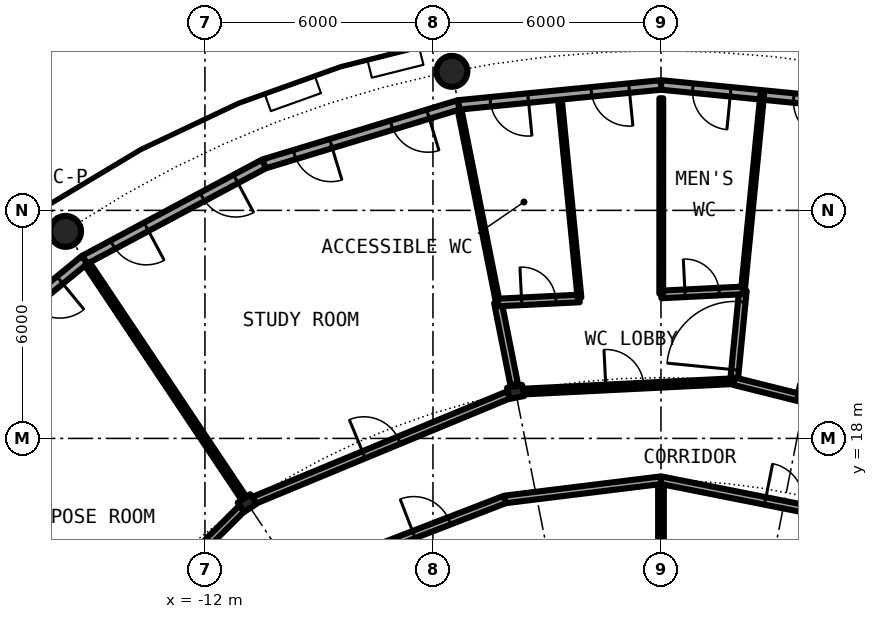
"""IFC4 building model, lengths in metres.
Left out: names, types, materials, properties, quantities, classifications, styles, units other than length and angle.
Written with IfcOpenShell. Run it as: python <this file> out.ifc"""

import sys

from ifc_helpers import new_model, si_unit, direction, frame, frame_2d, origin, origin_2d, place, context, subcontext, project, spatial, rectangle, hollow_circle, i_section, extrude, element, fill, save


model = new_model("IFC4")
c1 = context("Model", 3, precision=1e-05, world=origin(), true_north=direction((0.0, 1.0)))
c2 = subcontext(c1, "Body", "Model", "MODEL_VIEW")
j1 = project(units=[si_unit("LENGTHUNIT", "METRE"), si_unit("PLANEANGLEUNIT", "RADIAN")], contexts=[c1])
p1 = place(None, origin())
s1 = spatial("IfcSite", under=j1, at=p1, CompositionType="ELEMENT")
p2 = place(p1, origin())
s2 = spatial("IfcBuilding", under=s1, at=p2, CompositionType="ELEMENT")
p3 = place(p2, frame((0.0, 0.0, 208.5)))
s3 = spatial("IfcBuildingStorey", under=s2, at=p3, CompositionType="ELEMENT", Elevation=208.5)
for number, where, z_axis, x_axis in (
    (1, (-5.501, 27.658, 0.0), (0.0, 0.0, 1.0), (1.0, 0.0, 0.0)),
    (2, (-15.667, 23.448, 0.0), (0.0, 0.0, 1.0), (1.0, 0.0, 0.0)),
):
    element("IfcColumn", number, at=place(p3, frame(where, z_axis=z_axis, x_axis=x_axis)), inside=s3, PredefinedType="COLUMN", context=c2, shape_type="SweptSolid", body=[
        extrude(hollow_circle(Radius=0.406, WallThickness=0.03, at=origin_2d()), origin(), (0.0, 0.0, 1.0), 4.2),
    ])
for number, where, z_axis, x_axis in (
    (3, (3.824, 19.223, 0.0), (0.0, 0.0, 1.0), (0.195, 0.981, 0.0)),
    (4, (-3.824, 19.223, 0.0), (0.0, 0.0, 1.0), (-0.195, 0.981, 0.0)),
    (5, (-10.889, 16.297, 0.0), (0.0, 0.0, 1.0), (-0.556, 0.831, 0.0)),
):
    element("IfcColumn", number, at=place(p3, frame(where, z_axis=z_axis, x_axis=x_axis)), inside=s3, PredefinedType="COLUMN", context=c2, shape_type="SweptSolid", body=[
        extrude(i_section(OverallWidth=0.3, OverallDepth=0.4, WebThickness=0.013, FlangeThickness=0.024, FilletRadius=0.027, at=origin_2d()), origin(), (0.0, 0.0, 1.0), 4.2),
    ])
p4 = place(p3, frame((5.326, 26.775, 0.0), z_axis=(0.0, 0.0, 1.0), x_axis=(-0.995173996315, 0.098126026407, 0.0)))
e6 = element("IfcWall", 6, at=p4, inside=s3, PredefinedType="SOLIDWALL", context=c2, shape_type="SweptSolid", body=[
    extrude(rectangle(XDim=5.352, YDim=0.25, at=frame_2d((2.676, 0.0))), origin(), (0.0, 0.0, 1.0), 3.85),
])
p5 = place(p4, frame((0.841, 0.0, 0.0)))
e7 = element("IfcOpeningElement", 7, at=p5, cuts=e6, PredefinedType="OPENING", context=c2, shape_type="SweptSolid", body=[
    extrude(rectangle(XDim=1.0, YDim=2.2, at=frame_2d((0.5, 1.1))), frame((0.0, 0.135, 0.0), z_axis=(0.0, -1.0, 0.0), x_axis=(1.0, 0.0, 0.0)), (0.0, 0.0, 1.0), 0.27),
])
p6 = place(p4, frame((3.51, 0.0, 0.0)))
e8 = element("IfcOpeningElement", 8, at=p6, cuts=e6, PredefinedType="OPENING", context=c2, shape_type="SweptSolid", body=[
    extrude(rectangle(XDim=1.0, YDim=2.2, at=frame_2d((0.5, 1.1))), frame((0.0, 0.135, 0.0), z_axis=(0.0, -1.0, 0.0), x_axis=(1.0, 0.0, 0.0)), (0.0, 0.0, 1.0), 0.27),
])
p7 = place(p3, frame((0.0, 27.3, 0.0), z_axis=(0.0, 0.0, 1.0), x_axis=(-0.995173996315, -0.098126026407, 0.0)))
e9 = element("IfcWall", 9, at=p7, inside=s3, PredefinedType="SOLIDWALL", context=c2, shape_type="SweptSolid", body=[
    extrude(rectangle(XDim=5.352, YDim=0.25, at=frame_2d((2.676, 0.0))), origin(), (0.0, 0.0, 1.0), 3.85),
])
p8 = place(p7, frame((0.841, 0.0, 0.0)))
e10 = element("IfcOpeningElement", 10, at=p8, cuts=e9, PredefinedType="OPENING", context=c2, shape_type="SweptSolid", body=[
    extrude(rectangle(XDim=1.0, YDim=2.2, at=frame_2d((0.5, 1.1))), frame((0.0, 0.135, 0.0), z_axis=(0.0, -1.0, 0.0), x_axis=(1.0, 0.0, 0.0)), (0.0, 0.0, 1.0), 0.27),
])
p9 = place(p7, frame((3.51, 0.0, 0.0)))
e11 = element("IfcOpeningElement", 11, at=p9, cuts=e9, PredefinedType="OPENING", context=c2, shape_type="SweptSolid", body=[
    extrude(rectangle(XDim=1.0, YDim=2.2, at=frame_2d((0.5, 1.1))), frame((0.0, 0.135, 0.0), z_axis=(0.0, -1.0, 0.0), x_axis=(1.0, 0.0, 0.0)), (0.0, 0.0, 1.0), 0.27),
])
p10 = place(p3, frame((-5.326, 26.775, 0.0), z_axis=(0.0, 0.0, 1.0), x_axis=(-0.956965678721, -0.290201119486, 0.0)))
e12 = element("IfcWall", 12, at=p10, inside=s3, PredefinedType="SOLIDWALL", context=c2, shape_type="SweptSolid", body=[
    extrude(rectangle(XDim=5.351, YDim=0.25, at=frame_2d((2.676, 0.0))), origin(), (0.0, 0.0, 1.0), 3.85),
])
p11 = place(p10, frame((0.841, 0.0, 0.0)))
e13 = element("IfcOpeningElement", 13, at=p11, cuts=e12, PredefinedType="OPENING", context=c2, shape_type="SweptSolid", body=[
    extrude(rectangle(XDim=1.0, YDim=2.2, at=frame_2d((0.5, 1.1))), frame((0.0, 0.135, 0.0), z_axis=(0.0, -1.0, 0.0), x_axis=(1.0, 0.0, 0.0)), (0.0, 0.0, 1.0), 0.27),
])
p12 = place(p10, frame((3.51, 0.0, 0.0)))
e14 = element("IfcOpeningElement", 14, at=p12, cuts=e12, PredefinedType="OPENING", context=c2, shape_type="SweptSolid", body=[
    extrude(rectangle(XDim=1.0, YDim=2.2, at=frame_2d((0.5, 1.1))), frame((0.0, 0.135, 0.0), z_axis=(0.0, -1.0, 0.0), x_axis=(1.0, 0.0, 0.0)), (0.0, 0.0, 1.0), 0.27),
])
p13 = place(p3, frame((-10.447, 25.222, 0.0), z_axis=(0.0, 0.0, 1.0), x_axis=(-0.881915646801, -0.471407246368, 0.0)))
e15 = element("IfcWall", 15, at=p13, inside=s3, PredefinedType="SOLIDWALL", context=c2, shape_type="SweptSolid", body=[
    extrude(rectangle(XDim=5.352, YDim=0.25, at=frame_2d((2.676, 0.0))), origin(), (0.0, 0.0, 1.0), 3.85),
])
p14 = place(p13, frame((0.841, 0.0, 0.0)))
e16 = element("IfcOpeningElement", 16, at=p14, cuts=e15, PredefinedType="OPENING", context=c2, shape_type="SweptSolid", body=[
    extrude(rectangle(XDim=1.0, YDim=2.2, at=frame_2d((0.5, 1.1))), frame((0.0, 0.135, 0.0), z_axis=(0.0, -1.0, 0.0), x_axis=(1.0, 0.0, 0.0)), (0.0, 0.0, 1.0), 0.27),
])
p15 = place(p13, frame((3.51, 0.0, 0.0)))
e17 = element("IfcOpeningElement", 17, at=p15, cuts=e15, PredefinedType="OPENING", context=c2, shape_type="SweptSolid", body=[
    extrude(rectangle(XDim=1.0, YDim=2.2, at=frame_2d((0.5, 1.1))), frame((0.0, 0.135, 0.0), z_axis=(0.0, -1.0, 0.0), x_axis=(1.0, 0.0, 0.0)), (0.0, 0.0, 1.0), 0.27),
])
p16 = place(p3, frame((-15.167, 22.699, 0.0), z_axis=(0.0, 0.0, 1.0), x_axis=(-0.773019449054, -0.634382322723, 0.0)))
e18 = element("IfcWall", 18, at=p16, inside=s3, PredefinedType="SOLIDWALL", context=c2, shape_type="SweptSolid", body=[
    extrude(rectangle(XDim=5.352, YDim=0.25, at=frame_2d((2.676, 0.0))), origin(), (0.0, 0.0, 1.0), 3.85),
])
p17 = place(p16, frame((0.841, 0.0, 0.0)))
e19 = element("IfcOpeningElement", 19, at=p17, cuts=e18, PredefinedType="OPENING", context=c2, shape_type="SweptSolid", body=[
    extrude(rectangle(XDim=1.0, YDim=2.2, at=frame_2d((0.5, 1.1))), frame((0.0, 0.135, 0.0), z_axis=(0.0, -1.0, 0.0), x_axis=(1.0, 0.0, 0.0)), (0.0, 0.0, 1.0), 0.27),
])
p18 = place(p16, frame((3.51, 0.0, 0.0)))
e20 = element("IfcOpeningElement", 20, at=p18, cuts=e18, PredefinedType="OPENING", context=c2, shape_type="SweptSolid", body=[
    extrude(rectangle(XDim=1.0, YDim=2.2, at=frame_2d((0.5, 1.1))), frame((0.0, 0.135, 0.0), z_axis=(0.0, -1.0, 0.0), x_axis=(1.0, 0.0, 0.0)), (0.0, 0.0, 1.0), 0.27),
])
p19 = place(p3, frame((-15.098, 22.595, 0.0), z_axis=(0.0, 0.0, 1.0), x_axis=(0.555624175463, -0.831433566583, 0.0)))
e21 = element("IfcWall", 21, at=p19, inside=s3, PredefinedType="PARTITIONING", context=c2, shape_type="SweptSolid", body=[
    extrude(rectangle(XDim=7.375, YDim=0.15, at=frame_2d((3.688, 0.0))), origin(), (0.0, 0.0, 1.0), 3.85),
])
p20 = place(p3, frame((-5.301, 26.653, 0.0), z_axis=(0.0, 0.0, 1.0), x_axis=(0.194963902417, -0.980810418355, 0.0)))
e22 = element("IfcWall", 22, at=p20, inside=s3, PredefinedType="PARTITIONING", context=c2, shape_type="SweptSolid", body=[
    extrude(rectangle(XDim=5.176, YDim=0.1, at=frame_2d((2.588, 0.0))), origin(), (0.0, 0.0, 1.0), 3.85),
])
p21 = place(p3, frame((-4.292, 21.577, 0.0), z_axis=(0.0, 0.0, 1.0), x_axis=(0.195048593079, -0.980793579882, 0.0)))
e23 = element("IfcWall", 23, at=p21, inside=s3, PredefinedType="PARTITIONING", context=c2, shape_type="SweptSolid", body=[
    extrude(rectangle(XDim=2.199, YDim=0.2, at=frame_2d((1.1, 0.0))), origin(), (0.0, 0.0, 1.0), 3.85),
])
p22 = place(p3, frame((0.0, 7.72, 0.0), z_axis=(0.0, 0.0, 1.0), x_axis=(0.0, 1.0, 0.0)))
e24 = element("IfcWall", 24, at=p22, inside=s3, PredefinedType="PARTITIONING", context=c2, shape_type="SweptSolid", body=[
    extrude(rectangle(XDim=9.18, YDim=0.15, at=frame_2d((4.59, 0.0))), origin(), (0.0, 0.0, 1.0), 3.85),
])
p23 = place(p3, frame((1.921, 19.506, 0.0), z_axis=(0.0, 0.0, 1.0), x_axis=(0.097982433599, 0.995188144376, 0.0)))
e25 = element("IfcWall", 25, at=p23, inside=s3, PredefinedType="PARTITIONING", context=c2, shape_type="SweptSolid", body=[
    extrude(rectangle(XDim=2.399, YDim=0.2, at=frame_2d((1.2, 0.0))), origin(), (0.0, 0.0, 1.0), 3.85),
])
p24 = place(p23, frame((0.3, 0.0, 0.0)))
e26 = element("IfcOpeningElement", 26, at=p24, cuts=e25, PredefinedType="OPENING", context=c2, shape_type="SweptSolid", body=[
    extrude(rectangle(XDim=1.8, YDim=2.3, at=frame_2d((0.9, 1.15))), frame((0.0, 0.11, 0.0), z_axis=(0.0, -1.0, 0.0), x_axis=(1.0, 0.0, 0.0)), (0.0, 0.0, 1.0), 0.22),
])
p25 = place(p3, frame((2.156, 21.894, 0.0), z_axis=(0.0, 0.0, 1.0), x_axis=(0.098177046306, 0.995168964336, 0.0)))
e27 = element("IfcWall", 27, at=p25, inside=s3, PredefinedType="PARTITIONING", context=c2, shape_type="SweptSolid", body=[
    extrude(rectangle(XDim=5.175, YDim=0.1, at=frame_2d((2.587, 0.0))), origin(), (0.0, 0.0, 1.0), 3.85),
])
p26 = place(p3, frame((2.954, 7.132, 0.0), z_axis=(0.0, 0.0, 1.0), x_axis=(0.382646942224, 0.923894646378, 0.0)))
e28 = element("IfcWall", 28, at=p26, inside=s3, PredefinedType="PARTITIONING", context=c2, shape_type="SweptSolid", body=[
    extrude(rectangle(XDim=9.181, YDim=0.15, at=frame_2d((4.59, 0.0))), origin(), (0.0, 0.0, 1.0), 3.85),
])
p27 = place(p3, frame((0.0, 16.9, 0.0), z_axis=(0.0, 0.0, 1.0), x_axis=(0.980799374359, -0.195019453537, 0.0)))
e29 = element("IfcWall", 29, at=p27, inside=s3, PredefinedType="PARTITIONING", context=c2, shape_type="SweptSolid", body=[
    extrude(rectangle(XDim=6.594, YDim=0.2, at=frame_2d((3.297, 0.0))), origin(), (0.0, 0.0, 1.0), 3.85),
])
p28 = place(p27, frame((2.797, 0.0, 0.0)))
e30 = element("IfcOpeningElement", 30, at=p28, cuts=e29, PredefinedType="OPENING", context=c2, shape_type="SweptSolid", body=[
    extrude(rectangle(XDim=1.0, YDim=2.3, at=frame_2d((0.5, 1.15))), frame((0.0, 0.11, 0.0), z_axis=(0.0, -1.0, 0.0), x_axis=(1.0, 0.0, 0.0)), (0.0, 0.0, 1.0), 0.22),
])
p29 = place(p3, frame((-7.967, 14.904, 0.0), z_axis=(0.0, 0.0, 1.0), x_axis=(0.932943640288, 0.360022449363, 0.0)))
e31 = element("IfcWall", 31, at=p29, inside=s3, PredefinedType="PARTITIONING", context=c2, shape_type="SweptSolid", body=[
    extrude(rectangle(XDim=4.139, YDim=0.2, at=frame_2d((2.069, 0.0))), origin(), (0.0, 0.0, 1.0), 3.85),
])
p30 = place(p29, frame((1.569, 0.0, 0.0)))
e32 = element("IfcOpeningElement", 32, at=p30, cuts=e31, PredefinedType="OPENING", context=c2, shape_type="SweptSolid", body=[
    extrude(rectangle(XDim=1.0, YDim=2.3, at=frame_2d((0.5, 1.15))), frame((0.0, 0.11, 0.0), z_axis=(0.0, -1.0, 0.0), x_axis=(1.0, 0.0, 0.0)), (0.0, 0.0, 1.0), 0.22),
])
p31 = place(p3, frame((-4.106, 16.394, 0.0), z_axis=(0.0, 0.0, 1.0), x_axis=(0.992496033272, 0.122276833211, 0.0)))
e33 = element("IfcWall", 33, at=p31, inside=s3, PredefinedType="PARTITIONING", context=c2, shape_type="SweptSolid", body=[
    extrude(rectangle(XDim=4.137, YDim=0.2, at=frame_2d((2.068, 0.0))), origin(), (0.0, 0.0, 1.0), 3.85),
])
p32 = place(p3, frame((-16.189, 10.997, 0.0), z_axis=(0.0, 0.0, 1.0), x_axis=(0.707106781187, 0.707106781187, 0.0)))
e34 = element("IfcWall", 34, at=p32, inside=s3, PredefinedType="PARTITIONING", context=c2, shape_type="SweptSolid", body=[
    extrude(rectangle(XDim=7.343, YDim=0.2, at=frame_2d((3.671, 0.0))), origin(), (0.0, 0.0, 1.0), 3.6),
])
p33 = place(p32, frame((3.171, 0.0, 0.0)))
e35 = element("IfcOpeningElement", 35, at=p33, cuts=e34, PredefinedType="OPENING", context=c2, shape_type="SweptSolid", body=[
    extrude(rectangle(XDim=1.0, YDim=2.3, at=frame_2d((0.5, 1.15))), frame((0.0, 0.11, 0.0), z_axis=(0.0, -1.0, 0.0), x_axis=(1.0, 0.0, 0.0)), (0.0, 0.0, 1.0), 0.22),
])
p34 = place(p3, frame((-10.748, 16.355, 0.0), z_axis=(0.0, 0.0, 1.0), x_axis=(0.923857139404, 0.382737489635, 0.0)))
e36 = element("IfcWall", 36, at=p34, inside=s3, PredefinedType="PARTITIONING", context=c2, shape_type="SweptSolid", body=[
    extrude(rectangle(XDim=7.342, YDim=0.2, at=frame_2d((3.671, 0.0))), origin(), (0.0, 0.0, 1.0), 3.6),
])
p35 = place(p34, frame((3.171, 0.0, 0.0)))
e37 = element("IfcOpeningElement", 37, at=p35, cuts=e36, PredefinedType="OPENING", context=c2, shape_type="SweptSolid", body=[
    extrude(rectangle(XDim=1.0, YDim=2.3, at=frame_2d((0.5, 1.15))), frame((0.0, 0.11, 0.0), z_axis=(0.0, -1.0, 0.0), x_axis=(1.0, 0.0, 0.0)), (0.0, 0.0, 1.0), 0.22),
])
p36 = place(p3, frame((-3.672, 19.23, 0.0), z_axis=(0.0, 0.0, 1.0), x_axis=(0.998783562084, 0.049309188909, 0.0)))
e38 = element("IfcWall", 38, at=p36, inside=s3, PredefinedType="PARTITIONING", context=c2, shape_type="SweptSolid", body=[
    extrude(rectangle(XDim=5.6, YDim=0.15, at=frame_2d((2.8, 0.0))), origin(), (0.0, 0.0, 1.0), 3.6),
])
p37 = place(p36, frame((2.224, 0.0, 0.0)))
e39 = element("IfcOpeningElement", 39, at=p37, cuts=e38, PredefinedType="OPENING", context=c2, shape_type="SweptSolid", body=[
    extrude(rectangle(XDim=1.0, YDim=2.3, at=frame_2d((0.5, 1.15))), frame((0.0, 0.085, 0.0), z_axis=(0.0, -1.0, 0.0), x_axis=(1.0, 0.0, 0.0)), (0.0, 0.0, 1.0), 0.17),
])
p38 = place(p3, frame((1.921, 19.506, 0.0), z_axis=(0.0, 0.0, 1.0), x_axis=(0.969996560647, -0.243118638391, 0.0)))
e40 = element("IfcWall", 40, at=p38, inside=s3, PredefinedType="PARTITIONING", context=c2, shape_type="SweptSolid", body=[
    extrude(rectangle(XDim=1.773, YDim=0.2, at=frame_2d((0.887, 0.0))), origin(), (0.0, 0.0, 1.0), 3.6),
])
p39 = place(p3, frame((-4.292, 21.576, 0.0), z_axis=(0.0, 0.0, 1.0), x_axis=(0.998786623078, 0.049247147741, 0.0)))
e41 = element("IfcWall", 41, at=p39, inside=s3, PredefinedType="PARTITIONING", context=c2, shape_type="SweptSolid", body=[
    extrude(rectangle(XDim=2.152, YDim=0.2, at=frame_2d((1.076, 0.0))), origin(), (0.0, 0.0, 1.0), 3.85),
])
p40 = place(p39, frame((0.626, 0.0, 0.0)))
e42 = element("IfcOpeningElement", 42, at=p40, cuts=e41, PredefinedType="OPENING", context=c2, shape_type="SweptSolid", body=[
    extrude(rectangle(XDim=0.9, YDim=2.3, at=frame_2d((0.45, 1.15))), frame((0.0, 0.11, 0.0), z_axis=(0.0, -1.0, 0.0), x_axis=(1.0, 0.0, 0.0)), (0.0, 0.0, 1.0), 0.22),
])
p41 = place(p3, frame((0.007, 21.788, 0.0), z_axis=(0.0, 0.0, 1.0), x_axis=(0.998786623078, 0.049247147741, 0.0)))
e43 = element("IfcWall", 43, at=p41, inside=s3, PredefinedType="PARTITIONING", context=c2, shape_type="SweptSolid", body=[
    extrude(rectangle(XDim=2.152, YDim=0.2, at=frame_2d((1.076, 0.0))), origin(), (0.0, 0.0, 1.0), 3.85),
])
p42 = place(p41, frame((0.626, 0.0, 0.0)))
e44 = element("IfcOpeningElement", 44, at=p42, cuts=e43, PredefinedType="OPENING", context=c2, shape_type="SweptSolid", body=[
    extrude(rectangle(XDim=0.9, YDim=2.3, at=frame_2d((0.45, 1.15))), frame((0.0, 0.11, 0.0), z_axis=(0.0, -1.0, 0.0), x_axis=(1.0, 0.0, 0.0)), (0.0, 0.0, 1.0), 0.22),
])
p43 = place(p3, frame((0.007, 21.808, 0.0), z_axis=(0.0, 0.0, 1.0), x_axis=(0.000379848983, 0.999999927857, 0.0)))
e45 = element("IfcWall", 45, at=p43, inside=s3, PredefinedType="PARTITIONING", context=c2, shape_type="SweptSolid", body=[
    extrude(rectangle(XDim=5.142, YDim=0.1, at=frame_2d((2.571, 0.0))), origin(), (0.0, 0.0, 1.0), 3.85),
])
p44 = place(p3, frame((-2.65, 26.819, 0.0), z_axis=(0.0, 0.0, 1.0), x_axis=(0.098205932626, -0.995166114172, 0.0)))
e46 = element("IfcWall", 46, at=p44, inside=s3, PredefinedType="PARTITIONING", context=c2, shape_type="SweptSolid", body=[
    extrude(rectangle(XDim=5.141, YDim=0.1, at=frame_2d((2.571, 0.0))), origin(), (0.0, 0.0, 1.0), 3.85),
])
p45 = place(p5, origin())
e47 = element("IfcDoor", 47, at=p45, inside=s3, OperationType="SINGLE_SWING_LEFT", PredefinedType="DOOR", context=c2, shape_type="SweptSolid", body=[
    extrude(rectangle(XDim=1.0, YDim=2.2, at=frame_2d((0.5, 1.1))), frame((0.0, 0.025, 0.0), z_axis=(0.0, -1.0, 0.0), x_axis=(1.0, 0.0, 0.0)), (0.0, 0.0, 1.0), 0.05),
])
fill(e7, e47)
p46 = place(p6, origin())
e48 = element("IfcDoor", 48, at=p46, inside=s3, OperationType="SINGLE_SWING_LEFT", PredefinedType="DOOR", context=c2, shape_type="SweptSolid", body=[
    extrude(rectangle(XDim=1.0, YDim=2.2, at=frame_2d((0.5, 1.1))), frame((0.0, 0.025, 0.0), z_axis=(0.0, -1.0, 0.0), x_axis=(1.0, 0.0, 0.0)), (0.0, 0.0, 1.0), 0.05),
])
fill(e8, e48)
p47 = place(p8, origin())
e49 = element("IfcDoor", 49, at=p47, inside=s3, OperationType="SINGLE_SWING_LEFT", PredefinedType="DOOR", context=c2, shape_type="SweptSolid", body=[
    extrude(rectangle(XDim=1.0, YDim=2.2, at=frame_2d((0.5, 1.1))), frame((0.0, 0.025, 0.0), z_axis=(0.0, -1.0, 0.0), x_axis=(1.0, 0.0, 0.0)), (0.0, 0.0, 1.0), 0.05),
])
fill(e10, e49)
p48 = place(p9, origin())
e50 = element("IfcDoor", 50, at=p48, inside=s3, OperationType="SINGLE_SWING_LEFT", PredefinedType="DOOR", context=c2, shape_type="SweptSolid", body=[
    extrude(rectangle(XDim=1.0, YDim=2.2, at=frame_2d((0.5, 1.1))), frame((0.0, 0.025, 0.0), z_axis=(0.0, -1.0, 0.0), x_axis=(1.0, 0.0, 0.0)), (0.0, 0.0, 1.0), 0.05),
])
fill(e11, e50)
p49 = place(p11, origin())
e51 = element("IfcDoor", 51, at=p49, inside=s3, OperationType="SINGLE_SWING_LEFT", PredefinedType="DOOR", context=c2, shape_type="SweptSolid", body=[
    extrude(rectangle(XDim=1.0, YDim=2.2, at=frame_2d((0.5, 1.1))), frame((0.0, 0.025, 0.0), z_axis=(0.0, -1.0, 0.0), x_axis=(1.0, 0.0, 0.0)), (0.0, 0.0, 1.0), 0.05),
])
fill(e13, e51)
p50 = place(p12, origin())
e52 = element("IfcDoor", 52, at=p50, inside=s3, OperationType="SINGLE_SWING_LEFT", PredefinedType="DOOR", context=c2, shape_type="SweptSolid", body=[
    extrude(rectangle(XDim=1.0, YDim=2.2, at=frame_2d((0.5, 1.1))), frame((0.0, 0.025, 0.0), z_axis=(0.0, -1.0, 0.0), x_axis=(1.0, 0.0, 0.0)), (0.0, 0.0, 1.0), 0.05),
])
fill(e14, e52)
p51 = place(p14, origin())
e53 = element("IfcDoor", 53, at=p51, inside=s3, OperationType="SINGLE_SWING_LEFT", PredefinedType="DOOR", context=c2, shape_type="SweptSolid", body=[
    extrude(rectangle(XDim=1.0, YDim=2.2, at=frame_2d((0.5, 1.1))), frame((0.0, 0.025, 0.0), z_axis=(0.0, -1.0, 0.0), x_axis=(1.0, 0.0, 0.0)), (0.0, 0.0, 1.0), 0.05),
])
fill(e16, e53)
p52 = place(p15, origin())
e54 = element("IfcDoor", 54, at=p52, inside=s3, OperationType="SINGLE_SWING_LEFT", PredefinedType="DOOR", context=c2, shape_type="SweptSolid", body=[
    extrude(rectangle(XDim=1.0, YDim=2.2, at=frame_2d((0.5, 1.1))), frame((0.0, 0.025, 0.0), z_axis=(0.0, -1.0, 0.0), x_axis=(1.0, 0.0, 0.0)), (0.0, 0.0, 1.0), 0.05),
])
fill(e17, e54)
p53 = place(p17, origin())
e55 = element("IfcDoor", 55, at=p53, inside=s3, OperationType="SINGLE_SWING_LEFT", PredefinedType="DOOR", context=c2, shape_type="SweptSolid", body=[
    extrude(rectangle(XDim=1.0, YDim=2.2, at=frame_2d((0.5, 1.1))), frame((0.0, 0.025, 0.0), z_axis=(0.0, -1.0, 0.0), x_axis=(1.0, 0.0, 0.0)), (0.0, 0.0, 1.0), 0.05),
])
fill(e19, e55)
p54 = place(p37, origin())
e56 = element("IfcDoor", 56, at=p54, inside=s3, OperationType="SINGLE_SWING_LEFT", PredefinedType="DOOR", context=c2, shape_type="SweptSolid", body=[
    extrude(rectangle(XDim=1.0, YDim=2.3, at=frame_2d((0.5, 1.15))), frame((0.0, 0.025, 0.0), z_axis=(0.0, -1.0, 0.0), x_axis=(1.0, 0.0, 0.0)), (0.0, 0.0, 1.0), 0.05),
])
fill(e39, e56)
p55 = place(p42, origin())
e57 = element("IfcDoor", 57, at=p55, inside=s3, OperationType="SINGLE_SWING_LEFT", PredefinedType="DOOR", context=c2, shape_type="SweptSolid", body=[
    extrude(rectangle(XDim=0.9, YDim=2.3, at=frame_2d((0.45, 1.15))), frame((0.0, 0.025, 0.0), z_axis=(0.0, -1.0, 0.0), x_axis=(1.0, 0.0, 0.0)), (0.0, 0.0, 1.0), 0.05),
])
fill(e44, e57)
p56 = place(p40, origin())
e58 = element("IfcDoor", 58, at=p56, inside=s3, OperationType="SINGLE_SWING_RIGHT", PredefinedType="DOOR", context=c2, shape_type="SweptSolid", body=[
    extrude(rectangle(XDim=0.9, YDim=2.3, at=frame_2d((0.45, 1.15))), frame((0.0, 0.025, 0.0), z_axis=(0.0, -1.0, 0.0), x_axis=(1.0, 0.0, 0.0)), (0.0, 0.0, 1.0), 0.05),
])
fill(e42, e58)
p57 = place(p24, origin())
e59 = element("IfcDoor", 59, at=p57, inside=s3, OperationType="DOUBLE_DOOR_SINGLE_SWING", PredefinedType="DOOR", context=c2, shape_type="SweptSolid", body=[
    extrude(rectangle(XDim=1.8, YDim=2.3, at=frame_2d((0.9, 1.15))), frame((0.0, 0.025, 0.0), z_axis=(0.0, -1.0, 0.0), x_axis=(1.0, 0.0, 0.0)), (0.0, 0.0, 1.0), 0.05),
])
fill(e26, e59)
p58 = place(p35, origin())
e60 = element("IfcDoor", 60, at=p58, inside=s3, OperationType="SINGLE_SWING_RIGHT", PredefinedType="DOOR", context=c2, shape_type="SweptSolid", body=[
    extrude(rectangle(XDim=1.0, YDim=2.3, at=frame_2d((0.5, 1.15))), frame((0.0, 0.025, 0.0), z_axis=(0.0, -1.0, 0.0), x_axis=(1.0, 0.0, 0.0)), (0.0, 0.0, 1.0), 0.05),
])
fill(e37, e60)
p59 = place(p28, origin())
e61 = element("IfcDoor", 61, at=p59, inside=s3, OperationType="SINGLE_SWING_LEFT", PredefinedType="DOOR", context=c2, shape_type="SweptSolid", body=[
    extrude(rectangle(XDim=1.0, YDim=2.3, at=frame_2d((0.5, 1.15))), frame((0.0, 0.025, 0.0), z_axis=(0.0, -1.0, 0.0), x_axis=(1.0, 0.0, 0.0)), (0.0, 0.0, 1.0), 0.05),
])
fill(e30, e61)
p60 = place(p30, origin())
e62 = element("IfcDoor", 62, at=p60, inside=s3, OperationType="SINGLE_SWING_RIGHT", PredefinedType="DOOR", context=c2, shape_type="SweptSolid", body=[
    extrude(rectangle(XDim=1.0, YDim=2.3, at=frame_2d((0.5, 1.15))), frame((0.0, 0.025, 0.0), z_axis=(0.0, -1.0, 0.0), x_axis=(1.0, 0.0, 0.0)), (0.0, 0.0, 1.0), 0.05),
])
fill(e32, e62)
save(model, sys.argv[1])
